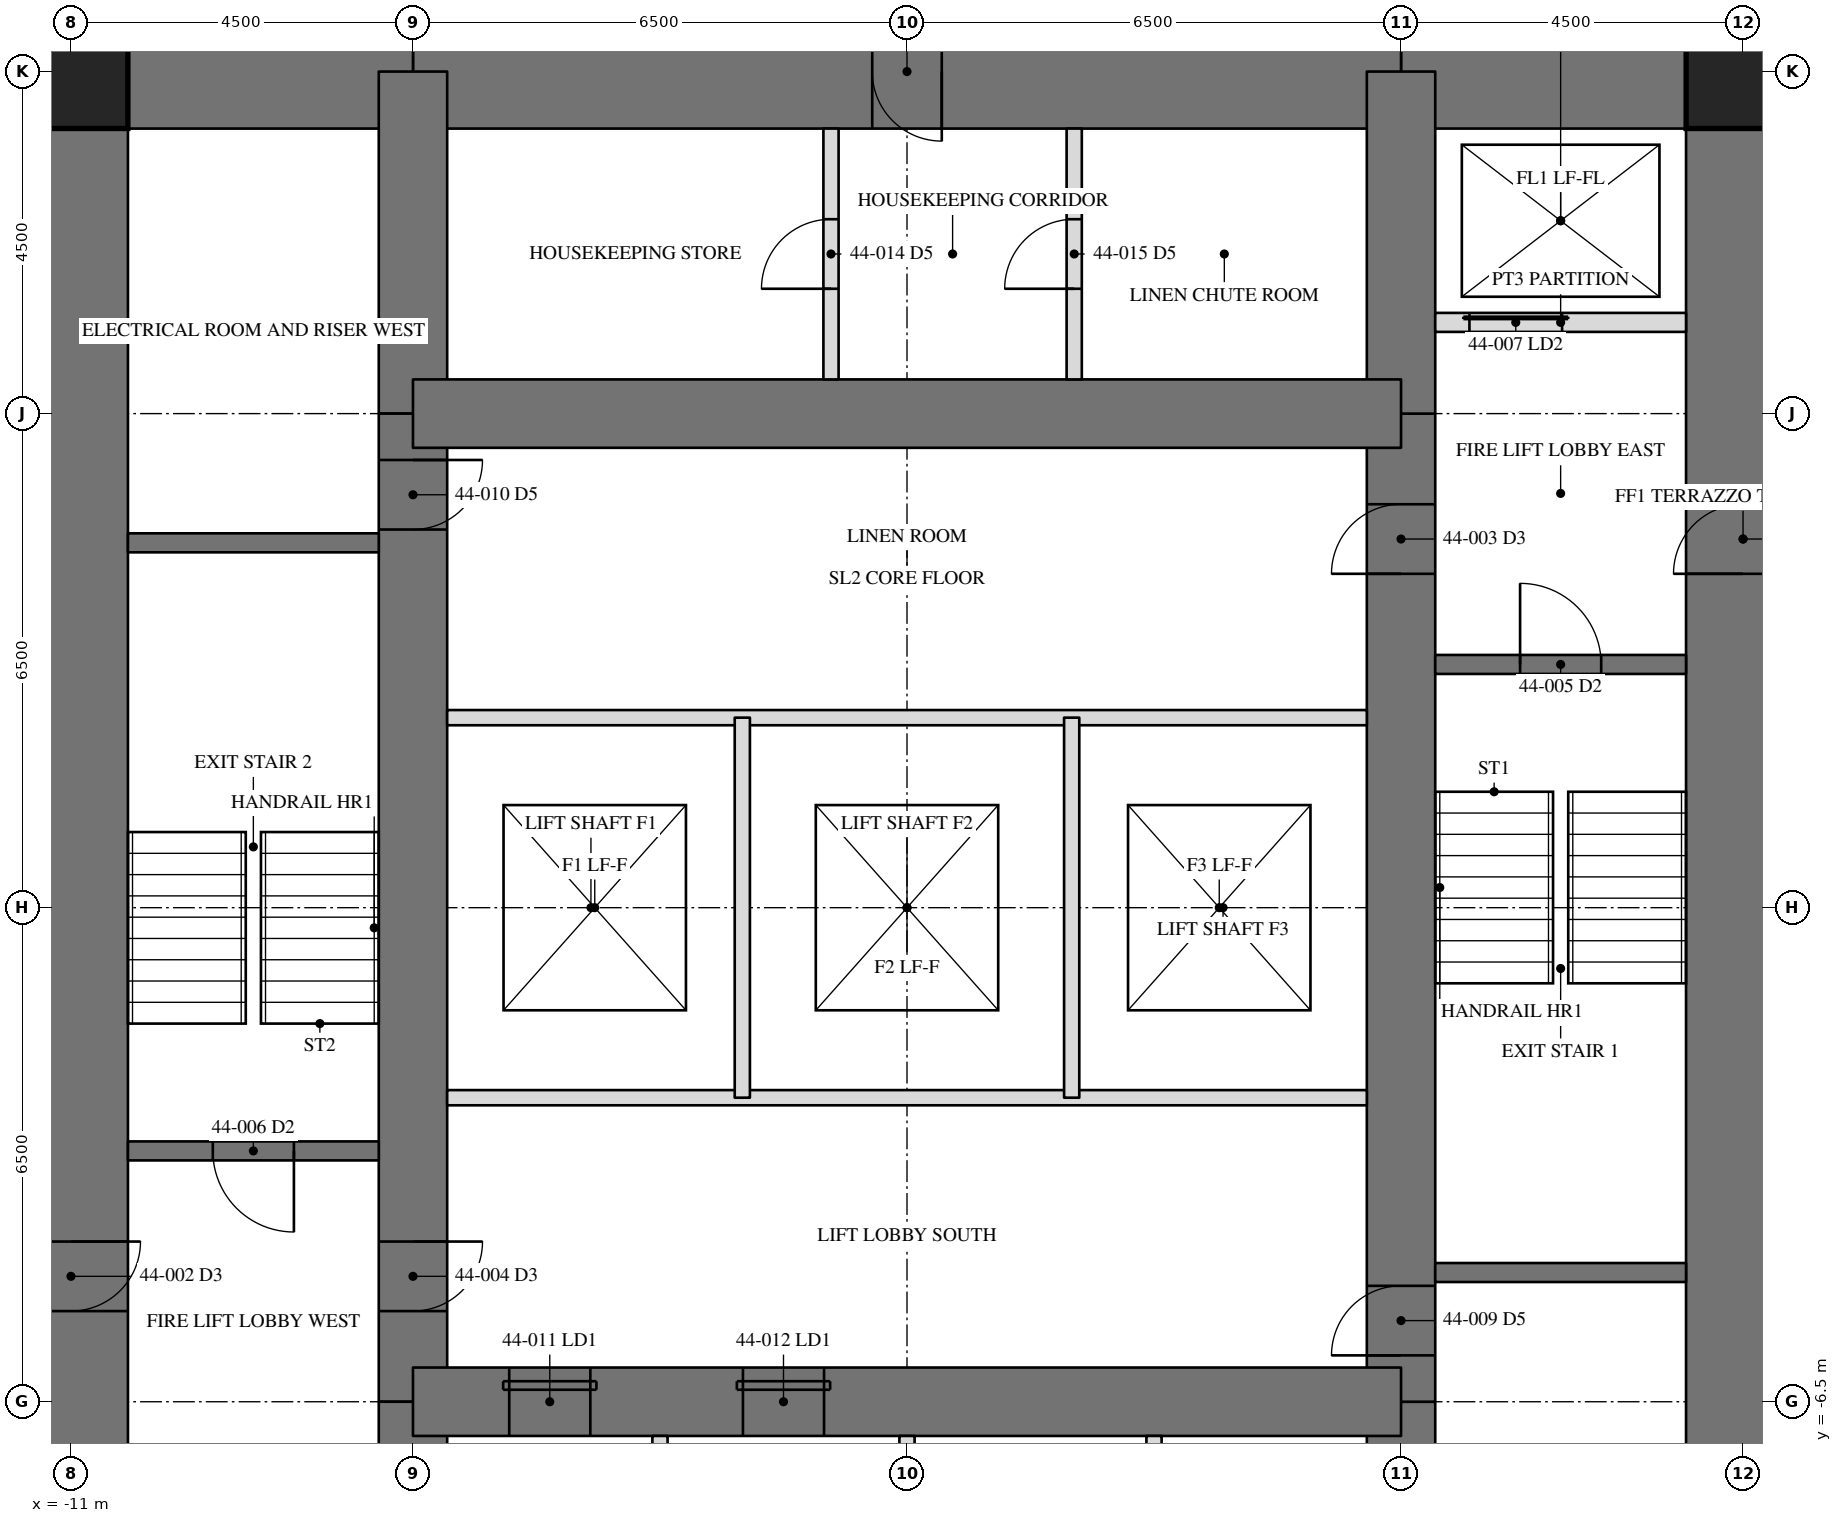
"""IFC4 building model, lengths in metres.
Left out: names, types, materials, properties, quantities, classifications, styles, units other than length and angle.
Written with IfcOpenShell. Run it as: python <this file> out.ifc"""

import sys

from ifc_helpers import new_model, si_unit, direction, frame, frame_2d, origin, origin_2d, place, context, subcontext, project, spatial, rectangle, hollow_rectangle, extrude, element, fill, save


model = new_model("IFC4")
c1 = context("Model", 3, precision=1e-05, world=origin(), true_north=direction((0.0, 1.0)))
c2 = subcontext(c1, "Body", "Model", "MODEL_VIEW")
j1 = project(units=[si_unit("LENGTHUNIT", "METRE"), si_unit("PLANEANGLEUNIT", "RADIAN")], contexts=[c1])
p1 = place(None, origin())
s1 = spatial("IfcSite", under=j1, at=p1, CompositionType="ELEMENT")
p2 = place(p1, origin())
s2 = spatial("IfcBuilding", under=s1, at=p2, CompositionType="ELEMENT")
p3 = place(p2, frame((0.0, 0.0, 190.7)))
s3 = spatial("IfcBuildingStorey", under=s2, at=p3, CompositionType="ELEMENT", Elevation=190.7)
p4 = place(p3, frame((11.0, -11.0, 0.0), z_axis=(0.0, 0.0, 1.0), x_axis=(0.0, 1.0, 0.0)))
e1 = element("IfcWall", 1, at=p4, inside=s3, PredefinedType="SHEAR", context=c2, shape_type="SweptSolid", body=[
    extrude(rectangle(XDim=22.0, YDim=1.5, at=frame_2d((11.0, 0.0))), origin(), (0.0, 0.0, 1.0), 3.5),
])
p5 = place(p4, frame((15.393, 0.0, 0.0)))
e2 = element("IfcOpeningElement", 2, at=p5, cuts=e1, PredefinedType="OPENING", context=c2, shape_type="SweptSolid", body=[
    extrude(rectangle(XDim=0.915, YDim=2.134, at=frame_2d((0.458, 1.067))), frame((0.0, 0.76, 0.0), z_axis=(0.0, -1.0, 0.0), x_axis=(1.0, 0.0, 0.0)), (0.0, 0.0, 1.0), 1.52),
])
p6 = place(p3, frame((-11.0, 11.0, 0.0), z_axis=(0.0, 0.0, 1.0), x_axis=(0.0, -1.0, 0.0)))
e3 = element("IfcWall", 3, at=p6, inside=s3, PredefinedType="SHEAR", context=c2, shape_type="SweptSolid", body=[
    extrude(rectangle(XDim=22.0, YDim=1.5, at=frame_2d((11.0, 0.0))), origin(), (0.0, 0.0, 1.0), 3.5),
])
p7 = place(p6, frame((15.393, 0.0, 0.0)))
e4 = element("IfcOpeningElement", 4, at=p7, cuts=e3, PredefinedType="OPENING", context=c2, shape_type="SweptSolid", body=[
    extrude(rectangle(XDim=0.915, YDim=2.134, at=frame_2d((0.458, 1.067))), frame((0.0, 0.76, 0.0), z_axis=(0.0, -1.0, 0.0), x_axis=(1.0, 0.0, 0.0)), (0.0, 0.0, 1.0), 1.52),
])
p8 = place(p3, frame((11.0, 11.0, 0.0), z_axis=(0.0, 0.0, 1.0), x_axis=(-1.0, 0.0, 0.0)))
e5 = element("IfcWall", 5, at=p8, inside=s3, PredefinedType="SHEAR", context=c2, shape_type="SweptSolid", body=[
    extrude(rectangle(XDim=4.5, YDim=1.5, at=frame_2d((2.25, 0.0))), origin(), (0.0, 0.0, 1.0), 3.5),
])
p9 = place(p3, frame((6.5, 11.0, 0.0), z_axis=(0.0, 0.0, 1.0), x_axis=(-1.0, 0.0, 0.0)))
e6 = element("IfcWall", 6, at=p9, inside=s3, PredefinedType="SHEAR", context=c2, shape_type="SweptSolid", body=[
    extrude(rectangle(XDim=13.0, YDim=1.5, at=frame_2d((6.5, 0.0))), origin(), (0.0, 0.0, 1.0), 3.5),
])
p10 = place(p9, frame((6.042, 0.0, 0.0)))
e7 = element("IfcOpeningElement", 7, at=p10, cuts=e6, PredefinedType="OPENING", context=c2, shape_type="SweptSolid", body=[
    extrude(rectangle(XDim=0.915, YDim=2.134, at=frame_2d((0.458, 1.067))), frame((0.0, 0.76, 0.0), z_axis=(0.0, -1.0, 0.0), x_axis=(1.0, 0.0, 0.0)), (0.0, 0.0, 1.0), 1.52),
])
p11 = place(p3, frame((-6.5, 11.0, 0.0), z_axis=(0.0, 0.0, 1.0), x_axis=(-1.0, 0.0, 0.0)))
e8 = element("IfcWall", 8, at=p11, inside=s3, PredefinedType="SHEAR", context=c2, shape_type="SweptSolid", body=[
    extrude(rectangle(XDim=4.5, YDim=1.5, at=frame_2d((2.25, 0.0))), origin(), (0.0, 0.0, 1.0), 3.5),
])
p12 = place(p3, frame((6.5, -11.0, 0.0), z_axis=(0.0, 0.0, 1.0), x_axis=(0.0, 1.0, 0.0)))
e9 = element("IfcWall", 9, at=p12, inside=s3, PredefinedType="SHEAR", context=c2, shape_type="SweptSolid", body=[
    extrude(rectangle(XDim=4.5, YDim=0.9, at=frame_2d((2.25, 0.0))), origin(), (0.0, 0.0, 1.0), 3.5),
])
p13 = place(p3, frame((6.5, -6.5, 0.0), z_axis=(0.0, 0.0, 1.0), x_axis=(0.0, 1.0, 0.0)))
e10 = element("IfcWall", 10, at=p13, inside=s3, PredefinedType="SHEAR", context=c2, shape_type="SweptSolid", body=[
    extrude(rectangle(XDim=13.0, YDim=0.9, at=frame_2d((6.5, 0.0))), origin(), (0.0, 0.0, 1.0), 3.5),
])
p14 = place(p13, frame((10.893, 0.0, 0.0)))
e11 = element("IfcOpeningElement", 11, at=p14, cuts=e10, PredefinedType="OPENING", context=c2, shape_type="SweptSolid", body=[
    extrude(rectangle(XDim=0.915, YDim=2.134, at=frame_2d((0.458, 1.067))), frame((0.0, 0.46, 0.0), z_axis=(0.0, -1.0, 0.0), x_axis=(1.0, 0.0, 0.0)), (0.0, 0.0, 1.0), 0.92),
])
p15 = place(p13, frame((0.61, 0.0, 0.0)))
e12 = element("IfcOpeningElement", 12, at=p15, cuts=e10, PredefinedType="OPENING", context=c2, shape_type="SweptSolid", body=[
    extrude(rectangle(XDim=0.915, YDim=2.134, at=frame_2d((0.458, 1.067))), frame((0.0, 0.46, 0.0), z_axis=(0.0, -1.0, 0.0), x_axis=(1.0, 0.0, 0.0)), (0.0, 0.0, 1.0), 0.92),
])
for number, where, z_axis, x_axis in (
    (13, (6.5, 6.5, 0.0), (0.0, 0.0, 1.0), (0.0, 1.0, 0.0)),
    (14, (-6.5, 11.0, 0.0), (0.0, 0.0, 1.0), (0.0, -1.0, 0.0)),
):
    element("IfcWall", number, at=place(p3, frame(where, z_axis=z_axis, x_axis=x_axis)), inside=s3, PredefinedType="SHEAR", context=c2, shape_type="SweptSolid", body=[
        extrude(rectangle(XDim=4.5, YDim=0.9, at=frame_2d((2.25, 0.0))), origin(), (0.0, 0.0, 1.0), 3.5),
    ])
p16 = place(p3, frame((-6.5, 6.5, 0.0), z_axis=(0.0, 0.0, 1.0), x_axis=(0.0, -1.0, 0.0)))
e15 = element("IfcWall", 15, at=p16, inside=s3, PredefinedType="SHEAR", context=c2, shape_type="SweptSolid", body=[
    extrude(rectangle(XDim=13.0, YDim=0.9, at=frame_2d((6.5, 0.0))), origin(), (0.0, 0.0, 1.0), 3.5),
])
p17 = place(p16, frame((10.893, 0.0, 0.0)))
e16 = element("IfcOpeningElement", 16, at=p17, cuts=e15, PredefinedType="OPENING", context=c2, shape_type="SweptSolid", body=[
    extrude(rectangle(XDim=0.915, YDim=2.134, at=frame_2d((0.458, 1.067))), frame((0.0, 0.46, 0.0), z_axis=(0.0, -1.0, 0.0), x_axis=(1.0, 0.0, 0.0)), (0.0, 0.0, 1.0), 0.92),
])
p18 = place(p16, frame((0.61, 0.0, 0.0)))
e17 = element("IfcOpeningElement", 17, at=p18, cuts=e15, PredefinedType="OPENING", context=c2, shape_type="SweptSolid", body=[
    extrude(rectangle(XDim=0.915, YDim=2.134, at=frame_2d((0.458, 1.067))), frame((0.0, 0.46, 0.0), z_axis=(0.0, -1.0, 0.0), x_axis=(1.0, 0.0, 0.0)), (0.0, 0.0, 1.0), 0.92),
])
p19 = place(p3, frame((-6.5, -6.5, 0.0), z_axis=(0.0, 0.0, 1.0), x_axis=(0.0, -1.0, 0.0)))
e18 = element("IfcWall", 18, at=p19, inside=s3, PredefinedType="SHEAR", context=c2, shape_type="SweptSolid", body=[
    extrude(rectangle(XDim=4.5, YDim=0.9, at=frame_2d((2.25, 0.0))), origin(), (0.0, 0.0, 1.0), 3.5),
])
p20 = place(p3, frame((6.5, 6.5, 0.0), z_axis=(0.0, 0.0, 1.0), x_axis=(-1.0, 0.0, 0.0)))
e19 = element("IfcWall", 19, at=p20, inside=s3, PredefinedType="SHEAR", context=c2, shape_type="SweptSolid", body=[
    extrude(rectangle(XDim=13.0, YDim=0.9, at=frame_2d((6.5, 0.0))), origin(), (0.0, 0.0, 1.0), 3.5),
])
p21 = place(p3, frame((-6.5, -6.5, 0.0), z_axis=(0.0, 0.0, 1.0), x_axis=(1.0, 0.0, 0.0)))
e20 = element("IfcWall", 20, at=p21, inside=s3, PredefinedType="SHEAR", context=c2, shape_type="SweptSolid", body=[
    extrude(rectangle(XDim=13.0, YDim=0.9, at=frame_2d((6.5, 0.0))), origin(), (0.0, 0.0, 1.0), 3.5),
])
p22 = place(p21, frame((1.267, 0.0, 0.0)))
e21 = element("IfcOpeningElement", 21, at=p22, cuts=e20, PredefinedType="OPENING", context=c2, shape_type="SweptSolid", body=[
    extrude(rectangle(XDim=1.067, YDim=2.134, at=frame_2d((0.533, 1.067))), frame((0.0, 0.46, 0.0), z_axis=(0.0, -1.0, 0.0), x_axis=(1.0, 0.0, 0.0)), (0.0, 0.0, 1.0), 0.92),
])
p23 = place(p21, frame((4.342, 0.0, 0.0)))
e22 = element("IfcOpeningElement", 22, at=p23, cuts=e20, PredefinedType="OPENING", context=c2, shape_type="SweptSolid", body=[
    extrude(rectangle(XDim=1.067, YDim=2.134, at=frame_2d((0.533, 1.067))), frame((0.0, 0.46, 0.0), z_axis=(0.0, -1.0, 0.0), x_axis=(1.0, 0.0, 0.0)), (0.0, 0.0, 1.0), 0.92),
])
for number, where, z_axis, x_axis in (
    (23, (11.0, 11.0, 0.0), (0.0, 0.0, 1.0), (1.0, 0.0, 0.0)),
    (24, (-11.0, 11.0, 0.0), (0.0, 0.0, 1.0), (1.0, 0.0, 0.0)),
):
    element("IfcColumn", number, at=place(p3, frame(where, z_axis=z_axis, x_axis=x_axis)), inside=s3, PredefinedType="COLUMN", context=c2, shape_type="SweptSolid", body=[
        extrude(hollow_rectangle(XDim=1.499, YDim=1.499, WallThickness=0.102, at=origin_2d()), origin(), (0.0, 0.0, 1.0), 3.5),
    ])
for number, where, z_axis, x_axis in (
    (25, (6.95, -4.8, 0.0), (0.0, 0.0, 1.0), (1.0, 0.0, 0.0)),
    (26, (-6.95, 4.8, 0.0), (0.0, 0.0, 1.0), (-1.0, 0.0, 0.0)),
):
    element("IfcWall", number, at=place(p3, frame(where, z_axis=z_axis, x_axis=x_axis)), inside=s3, PredefinedType="SOLIDWALL", context=c2, shape_type="SweptSolid", body=[
        extrude(rectangle(XDim=3.3, YDim=0.25, at=frame_2d((1.65, 0.0))), origin(), (0.0, 0.0, 1.0), 3.31),
    ])
p24 = place(p3, frame((6.95, 3.2, 0.0), z_axis=(0.0, 0.0, 1.0), x_axis=(1.0, 0.0, 0.0)))
e27 = element("IfcWall", 27, at=p24, inside=s3, PredefinedType="SOLIDWALL", context=c2, shape_type="SweptSolid", body=[
    extrude(rectangle(XDim=3.3, YDim=0.25, at=frame_2d((1.65, 0.0))), origin(), (0.0, 0.0, 1.0), 3.31),
])
p25 = place(p24, frame((1.116, 0.0, 0.0)))
e28 = element("IfcOpeningElement", 28, at=p25, cuts=e27, PredefinedType="OPENING", context=c2, shape_type="SweptSolid", body=[
    extrude(rectangle(XDim=1.067, YDim=2.134, at=frame_2d((0.533, 1.067))), frame((0.0, 0.135, 0.0), z_axis=(0.0, -1.0, 0.0), x_axis=(1.0, 0.0, 0.0)), (0.0, 0.0, 1.0), 0.27),
])
p26 = place(p3, frame((-6.95, -3.2, 0.0), z_axis=(0.0, 0.0, 1.0), x_axis=(-1.0, 0.0, 0.0)))
e29 = element("IfcWall", 29, at=p26, inside=s3, PredefinedType="SOLIDWALL", context=c2, shape_type="SweptSolid", body=[
    extrude(rectangle(XDim=3.3, YDim=0.25, at=frame_2d((1.65, 0.0))), origin(), (0.0, 0.0, 1.0), 3.31),
])
p27 = place(p26, frame((1.116, 0.0, 0.0)))
e30 = element("IfcOpeningElement", 30, at=p27, cuts=e29, PredefinedType="OPENING", context=c2, shape_type="SweptSolid", body=[
    extrude(rectangle(XDim=1.067, YDim=2.134, at=frame_2d((0.533, 1.067))), frame((0.0, 0.135, 0.0), z_axis=(0.0, -1.0, 0.0), x_axis=(1.0, 0.0, 0.0)), (0.0, 0.0, 1.0), 0.27),
])
p28 = place(p3, frame((6.95, 7.7, 0.0), z_axis=(0.0, 0.0, 1.0), x_axis=(1.0, 0.0, 0.0)))
e31 = element("IfcWall", 31, at=p28, inside=s3, PredefinedType="PARTITIONING", context=c2, shape_type="SweptSolid", body=[
    extrude(rectangle(XDim=3.3, YDim=0.25, at=frame_2d((1.65, 0.0))), origin(), (0.0, 0.0, 1.0), 3.31),
])
p29 = place(p28, frame((0.45, 0.0, 0.0)))
e32 = element("IfcOpeningElement", 32, at=p29, cuts=e31, PredefinedType="OPENING", context=c2, shape_type="SweptSolid", body=[
    extrude(rectangle(XDim=1.219, YDim=2.134, at=frame_2d((0.609, 1.067))), frame((0.0, 0.135, 0.0), z_axis=(0.0, -1.0, 0.0), x_axis=(1.0, 0.0, 0.0)), (0.0, 0.0, 1.0), 0.27),
])
for number, where, z_axis, x_axis in (
    (33, (-6.05, 2.5, 0.0), (0.0, 0.0, 1.0), (1.0, 0.0, 0.0)),
    (34, (6.05, -2.5, 0.0), (0.0, 0.0, 1.0), (-1.0, 0.0, 0.0)),
):
    element("IfcWall", number, at=place(p3, frame(where, z_axis=z_axis, x_axis=x_axis)), inside=s3, PredefinedType="PARTITIONING", context=c2, shape_type="SweptSolid", body=[
        extrude(rectangle(XDim=12.1, YDim=0.2, at=frame_2d((6.05, 0.0))), origin(), (0.0, 0.0, 1.0), 3.31),
    ])
for number, where, z_axis, x_axis in (
    (35, (-3.25, -10.25, 0.0), (0.0, 0.0, 1.0), (0.0, 1.0, 0.0)),
    (36, (0.0, -10.25, 0.0), (0.0, 0.0, 1.0), (0.0, 1.0, 0.0)),
    (37, (3.25, -10.25, 0.0), (0.0, 0.0, 1.0), (0.0, 1.0, 0.0)),
):
    element("IfcWall", number, at=place(p3, frame(where, z_axis=z_axis, x_axis=x_axis)), inside=s3, PredefinedType="PARTITIONING", context=c2, shape_type="SweptSolid", body=[
        extrude(rectangle(XDim=3.3, YDim=0.2, at=frame_2d((1.65, 0.0))), origin(), (0.0, 0.0, 1.0), 3.31),
    ])
for number, where, z_axis, x_axis in (
    (38, (-2.167, -2.5, 0.0), (0.0, 0.0, 1.0), (0.0, 1.0, 0.0)),
    (39, (2.167, -2.5, 0.0), (0.0, 0.0, 1.0), (0.0, 1.0, 0.0)),
):
    element("IfcWall", number, at=place(p3, frame(where, z_axis=z_axis, x_axis=x_axis)), inside=s3, PredefinedType="PARTITIONING", context=c2, shape_type="SweptSolid", body=[
        extrude(rectangle(XDim=5.0, YDim=0.2, at=frame_2d((2.5, 0.0))), origin(), (0.0, 0.0, 1.0), 3.31),
    ])
p30 = place(p3, frame((-1.0, 6.95, 0.0), z_axis=(0.0, 0.0, 1.0), x_axis=(0.0, 1.0, 0.0)))
e40 = element("IfcWall", 40, at=p30, inside=s3, PredefinedType="PARTITIONING", context=c2, shape_type="SweptSolid", body=[
    extrude(rectangle(XDim=3.3, YDim=0.2, at=frame_2d((1.65, 0.0))), origin(), (0.0, 0.0, 1.0), 3.31),
])
p31 = place(p30, frame((1.192, 0.0, 0.0)))
e41 = element("IfcOpeningElement", 41, at=p31, cuts=e40, PredefinedType="OPENING", context=c2, shape_type="SweptSolid", body=[
    extrude(rectangle(XDim=0.915, YDim=2.134, at=frame_2d((0.458, 1.067))), frame((0.0, 0.11, 0.0), z_axis=(0.0, -1.0, 0.0), x_axis=(1.0, 0.0, 0.0)), (0.0, 0.0, 1.0), 0.22),
])
p32 = place(p3, frame((2.2, 6.95, 0.0), z_axis=(0.0, 0.0, 1.0), x_axis=(0.0, 1.0, 0.0)))
e42 = element("IfcWall", 42, at=p32, inside=s3, PredefinedType="PARTITIONING", context=c2, shape_type="SweptSolid", body=[
    extrude(rectangle(XDim=3.3, YDim=0.2, at=frame_2d((1.65, 0.0))), origin(), (0.0, 0.0, 1.0), 3.31),
])
p33 = place(p32, frame((1.192, 0.0, 0.0)))
e43 = element("IfcOpeningElement", 43, at=p33, cuts=e42, PredefinedType="OPENING", context=c2, shape_type="SweptSolid", body=[
    extrude(rectangle(XDim=0.915, YDim=2.134, at=frame_2d((0.458, 1.067))), frame((0.0, 0.11, 0.0), z_axis=(0.0, -1.0, 0.0), x_axis=(1.0, 0.0, 0.0)), (0.0, 0.0, 1.0), 0.22),
])
p34 = place(p14, origin())
e44 = element("IfcDoor", 44, at=p34, inside=s3, OperationType="SINGLE_SWING_RIGHT", PredefinedType="DOOR", context=c2, shape_type="SweptSolid", body=[
    extrude(rectangle(XDim=0.915, YDim=2.134, at=frame_2d((0.458, 1.067))), frame((0.0, -0.375, 0.0), z_axis=(0.0, -1.0, 0.0), x_axis=(1.0, 0.0, 0.0)), (0.0, 0.0, 1.0), 0.05),
])
fill(e11, e44)
p35 = place(p17, origin())
e45 = element("IfcDoor", 45, at=p35, inside=s3, OperationType="SINGLE_SWING_RIGHT", PredefinedType="DOOR", context=c2, shape_type="SweptSolid", body=[
    extrude(rectangle(XDim=0.915, YDim=2.134, at=frame_2d((0.458, 1.067))), frame((0.0, -0.375, 0.0), z_axis=(0.0, -1.0, 0.0), x_axis=(1.0, 0.0, 0.0)), (0.0, 0.0, 1.0), 0.05),
])
fill(e16, e45)
p36 = place(p25, origin())
e46 = element("IfcDoor", 46, at=p36, inside=s3, OperationType="SINGLE_SWING_LEFT", PredefinedType="DOOR", context=c2, shape_type="SweptSolid", body=[
    extrude(rectangle(XDim=1.067, YDim=2.134, at=frame_2d((0.533, 1.067))), frame((0.0, 0.025, 0.0), z_axis=(0.0, -1.0, 0.0), x_axis=(1.0, 0.0, 0.0)), (0.0, 0.0, 1.0), 0.05),
])
fill(e28, e46)
p37 = place(p27, origin())
e47 = element("IfcDoor", 47, at=p37, inside=s3, OperationType="SINGLE_SWING_LEFT", PredefinedType="DOOR", context=c2, shape_type="SweptSolid", body=[
    extrude(rectangle(XDim=1.067, YDim=2.134, at=frame_2d((0.533, 1.067))), frame((0.0, 0.025, 0.0), z_axis=(0.0, -1.0, 0.0), x_axis=(1.0, 0.0, 0.0)), (0.0, 0.0, 1.0), 0.05),
])
fill(e30, e47)
p38 = place(p29, origin())
e48 = element("IfcDoor", 48, at=p38, inside=s3, OperationType="SLIDING_TO_LEFT", PredefinedType="DOOR", context=c2, shape_type="SweptSolid", body=[
    extrude(rectangle(XDim=1.219, YDim=2.134, at=frame_2d((0.609, 1.067))), frame((0.0, 0.025, 0.0), z_axis=(0.0, -1.0, 0.0), x_axis=(1.0, 0.0, 0.0)), (0.0, 0.0, 1.0), 0.05),
])
fill(e32, e48)
p39 = place(p15, origin())
e49 = element("IfcDoor", 49, at=p39, inside=s3, OperationType="SINGLE_SWING_RIGHT", PredefinedType="DOOR", context=c2, shape_type="SweptSolid", body=[
    extrude(rectangle(XDim=0.915, YDim=2.134, at=frame_2d((0.458, 1.067))), frame((0.0, -0.375, 0.0), z_axis=(0.0, -1.0, 0.0), x_axis=(1.0, 0.0, 0.0)), (0.0, 0.0, 1.0), 0.05),
])
fill(e12, e49)
p40 = place(p18, origin())
e50 = element("IfcDoor", 50, at=p40, inside=s3, OperationType="SINGLE_SWING_RIGHT", PredefinedType="DOOR", context=c2, shape_type="SweptSolid", body=[
    extrude(rectangle(XDim=0.915, YDim=2.134, at=frame_2d((0.458, 1.067))), frame((0.0, -0.375, 0.0), z_axis=(0.0, -1.0, 0.0), x_axis=(1.0, 0.0, 0.0)), (0.0, 0.0, 1.0), 0.05),
])
fill(e17, e50)
p41 = place(p22, origin())
e51 = element("IfcDoor", 51, at=p41, inside=s3, OperationType="SLIDING_TO_LEFT", PredefinedType="DOOR", context=c2, shape_type="SweptSolid", body=[
    extrude(rectangle(XDim=1.067, YDim=2.134, at=frame_2d((0.533, 1.067))), frame((0.0, -0.375, 0.0), z_axis=(0.0, -1.0, 0.0), x_axis=(1.0, 0.0, 0.0)), (0.0, 0.0, 1.0), 0.05),
])
fill(e21, e51)
p42 = place(p23, origin())
e52 = element("IfcDoor", 52, at=p42, inside=s3, OperationType="SLIDING_TO_LEFT", PredefinedType="DOOR", context=c2, shape_type="SweptSolid", body=[
    extrude(rectangle(XDim=1.067, YDim=2.134, at=frame_2d((0.533, 1.067))), frame((0.0, -0.375, 0.0), z_axis=(0.0, -1.0, 0.0), x_axis=(1.0, 0.0, 0.0)), (0.0, 0.0, 1.0), 0.05),
])
fill(e22, e52)
p43 = place(p10, origin())
e53 = element("IfcDoor", 53, at=p43, inside=s3, OperationType="SINGLE_SWING_RIGHT", PredefinedType="DOOR", context=c2, shape_type="SweptSolid", body=[
    extrude(rectangle(XDim=0.915, YDim=2.134, at=frame_2d((0.458, 1.067))), frame((0.0, 0.025, 0.0), z_axis=(0.0, -1.0, 0.0), x_axis=(1.0, 0.0, 0.0)), (0.0, 0.0, 1.0), 0.05),
])
fill(e7, e53)
p44 = place(p31, origin())
e54 = element("IfcDoor", 54, at=p44, inside=s3, OperationType="SINGLE_SWING_RIGHT", PredefinedType="DOOR", context=c2, shape_type="SweptSolid", body=[
    extrude(rectangle(XDim=0.915, YDim=2.134, at=frame_2d((0.458, 1.067))), frame((0.0, 0.025, 0.0), z_axis=(0.0, -1.0, 0.0), x_axis=(1.0, 0.0, 0.0)), (0.0, 0.0, 1.0), 0.05),
])
fill(e41, e54)
p45 = place(p33, origin())
e55 = element("IfcDoor", 55, at=p45, inside=s3, OperationType="SINGLE_SWING_RIGHT", PredefinedType="DOOR", context=c2, shape_type="SweptSolid", body=[
    extrude(rectangle(XDim=0.915, YDim=2.134, at=frame_2d((0.458, 1.067))), frame((0.0, 0.025, 0.0), z_axis=(0.0, -1.0, 0.0), x_axis=(1.0, 0.0, 0.0)), (0.0, 0.0, 1.0), 0.05),
])
fill(e43, e55)
save(model, sys.argv[1])
